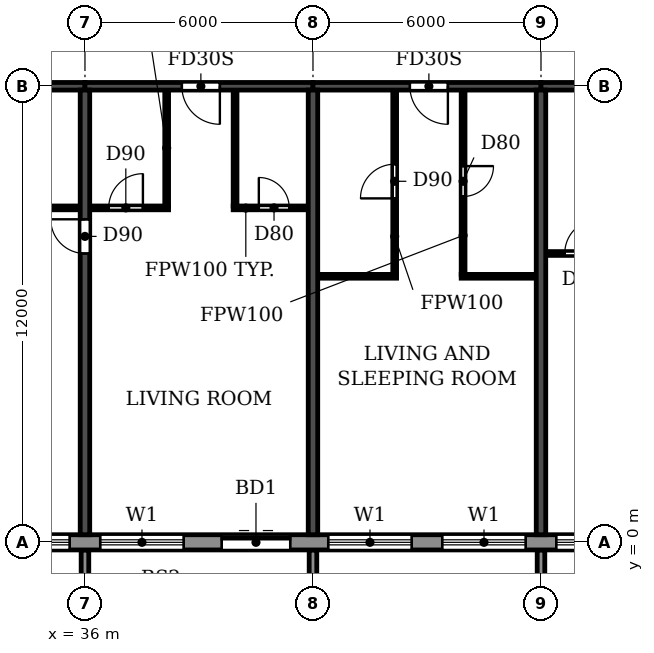
"""IFC4 building model, lengths in metres.
Left out: names, types, materials, properties, quantities, classifications, styles, units other than length and angle.
Written with IfcOpenShell. Run it as: python <this file> out.ifc"""

import sys

from ifc_helpers import new_model, si_unit, direction, frame, frame_2d, origin, place, context, subcontext, project, spatial, polyline, rectangle, outline, extrude, source, transform, mapped, element, fill, save


model = new_model("IFC4")
c1 = context("Model", 3, precision=1e-05, world=origin(), true_north=direction((0.0, 1.0)))
c2 = subcontext(c1, "Body", "Model", "MODEL_VIEW")
j1 = project(units=[si_unit("LENGTHUNIT", "METRE"), si_unit("PLANEANGLEUNIT", "RADIAN")], contexts=[c1])
p1 = place(None, origin())
s1 = spatial("IfcSite", under=j1, at=p1, CompositionType="ELEMENT")
p2 = place(p1, origin())
s2 = spatial("IfcBuilding", under=s1, at=p2, CompositionType="ELEMENT")
p3 = place(p2, frame((0.0, 0.0, 257.7)))
s3 = spatial("IfcBuildingStorey", under=s2, at=p3, CompositionType="ELEMENT", Elevation=257.7)
p4 = place(p3, frame((36.0, 0.2, 0.0), z_axis=(0.0, 0.0, 1.0), x_axis=(0.0, 1.0, 0.0)))
e1 = element("IfcWall", 1, at=p4, inside=s3, PredefinedType="SHEAR", context=c2, shape_type="SweptSolid", body=[
    extrude(rectangle(XDim=11.7, YDim=0.25, at=frame_2d((5.85, 0.0))), origin(), (0.0, 0.0, 1.0), 3.0),
])
p5 = place(p4, frame((7.4, 0.0, 0.0)))
e2 = element("IfcOpeningElement", 2, at=p5, cuts=e1, PredefinedType="OPENING", context=c2, shape_type="SweptSolid", body=[
    extrude(rectangle(XDim=0.9, YDim=2.1, at=frame_2d((0.45, 1.05))), frame((0.0, 0.135, 0.0), z_axis=(0.0, -1.0, 0.0), x_axis=(1.0, 0.0, 0.0)), (0.0, 0.0, 1.0), 0.27),
])
for number, where, z_axis, x_axis in (
    (3, (42.0, 0.2, 0.0), (0.0, 0.0, 1.0), (0.0, 1.0, 0.0)),
    (4, (48.0, 0.2, 0.0), (0.0, 0.0, 1.0), (0.0, 1.0, 0.0)),
):
    element("IfcWall", number, at=place(p3, frame(where, z_axis=z_axis, x_axis=x_axis)), inside=s3, PredefinedType="SHEAR", context=c2, shape_type="SweptSolid", body=[
        extrude(rectangle(XDim=11.7, YDim=0.25, at=frame_2d((5.85, 0.0))), origin(), (0.0, 0.0, 1.0), 3.0),
    ])
p6 = place(p3, frame((30.0, 12.0, 0.0), z_axis=(0.0, 0.0, 1.0), x_axis=(1.0, 0.0, 0.0)))
e5 = element("IfcWall", 5, at=p6, inside=s3, PredefinedType="SHEAR", context=c2, shape_type="SweptSolid", body=[
    extrude(rectangle(XDim=6.0, YDim=0.2, at=frame_2d((3.0, 0.0))), origin(), (0.0, 0.0, 1.0), 2.4),
])
p7 = place(p3, frame((36.0, 12.0, 0.0), z_axis=(0.0, 0.0, 1.0), x_axis=(1.0, 0.0, 0.0)))
e6 = element("IfcWall", 6, at=p7, inside=s3, PredefinedType="SHEAR", context=c2, shape_type="SweptSolid", body=[
    extrude(rectangle(XDim=6.0, YDim=0.2, at=frame_2d((3.0, 0.0))), origin(), (0.0, 0.0, 1.0), 2.4),
])
p8 = place(p7, frame((2.55, 0.0, 0.0)))
e7 = element("IfcOpeningElement", 7, at=p8, cuts=e6, PredefinedType="OPENING", context=c2, shape_type="SweptSolid", body=[
    extrude(rectangle(XDim=1.0, YDim=2.1, at=frame_2d((0.5, 1.05))), frame((0.0, 0.11, 0.0), z_axis=(0.0, -1.0, 0.0), x_axis=(1.0, 0.0, 0.0)), (0.0, 0.0, 1.0), 0.22),
])
p9 = place(p3, frame((42.0, 12.0, 0.0), z_axis=(0.0, 0.0, 1.0), x_axis=(1.0, 0.0, 0.0)))
e8 = element("IfcWall", 8, at=p9, inside=s3, PredefinedType="SHEAR", context=c2, shape_type="SweptSolid", body=[
    extrude(rectangle(XDim=6.0, YDim=0.2, at=frame_2d((3.0, 0.0))), origin(), (0.0, 0.0, 1.0), 2.4),
])
p10 = place(p9, frame((2.55, 0.0, 0.0)))
e9 = element("IfcOpeningElement", 9, at=p10, cuts=e8, PredefinedType="OPENING", context=c2, shape_type="SweptSolid", body=[
    extrude(rectangle(XDim=1.0, YDim=2.1, at=frame_2d((0.5, 1.05))), frame((0.0, 0.11, 0.0), z_axis=(0.0, -1.0, 0.0), x_axis=(1.0, 0.0, 0.0)), (0.0, 0.0, 1.0), 0.22),
])
p11 = place(p3, frame((48.0, 12.0, 0.0), z_axis=(0.0, 0.0, 1.0), x_axis=(1.0, 0.0, 0.0)))
e10 = element("IfcWall", 10, at=p11, inside=s3, PredefinedType="SHEAR", context=c2, shape_type="SweptSolid", body=[
    extrude(rectangle(XDim=6.0, YDim=0.2, at=frame_2d((3.0, 0.0))), origin(), (0.0, 0.0, 1.0), 2.4),
])
p12 = place(p11, frame((2.55, 0.0, 0.0)))
e11 = element("IfcOpeningElement", 11, at=p12, cuts=e10, PredefinedType="OPENING", context=c2, shape_type="SweptSolid", body=[
    extrude(rectangle(XDim=1.0, YDim=2.1, at=frame_2d((0.5, 1.05))), frame((0.0, 0.11, 0.0), z_axis=(0.0, -1.0, 0.0), x_axis=(1.0, 0.0, 0.0)), (0.0, 0.0, 1.0), 0.22),
])
p13 = place(p3, frame((22.683, 0.0, 0.0), z_axis=(0.0, 0.0, 1.0), x_axis=(1.0, 0.0, 0.0)))
e12 = element("IfcWall", 12, at=p13, inside=s3, PredefinedType="STANDARD", context=c2, shape_type="SweptSolid", body=[
    extrude(rectangle(XDim=56.634, YDim=0.4, at=frame_2d((28.317, 0.0))), origin(), (0.0, 0.0, 1.0), 3.0),
])
p14 = place(p13, frame((1.717, 0.0, 0.9)))
e13 = element("IfcOpeningElement", 13, at=p14, cuts=e12, PredefinedType="OPENING", context=c2, shape_type="SweptSolid", body=[
    extrude(rectangle(XDim=2.2, YDim=1.5, at=frame_2d((1.1, 0.75))), frame((0.0, 0.21, 0.0), z_axis=(0.0, -1.0, 0.0), x_axis=(1.0, 0.0, 0.0)), (0.0, 0.0, 1.0), 0.42),
])
p15 = place(p13, frame((4.917, 0.0, 0.0)))
e14 = element("IfcOpeningElement", 14, at=p15, cuts=e12, PredefinedType="OPENING", context=c2, shape_type="SweptSolid", body=[
    extrude(rectangle(XDim=1.8, YDim=2.4, at=frame_2d((0.9, 1.2))), frame((0.0, 0.21, 0.0), z_axis=(0.0, -1.0, 0.0), x_axis=(1.0, 0.0, 0.0)), (0.0, 0.0, 1.0), 0.42),
])
p16 = place(p13, frame((7.717, 0.0, 0.9)))
e15 = element("IfcOpeningElement", 15, at=p16, cuts=e12, PredefinedType="OPENING", context=c2, shape_type="SweptSolid", body=[
    extrude(rectangle(XDim=2.2, YDim=1.5, at=frame_2d((1.1, 0.75))), frame((0.0, 0.21, 0.0), z_axis=(0.0, -1.0, 0.0), x_axis=(1.0, 0.0, 0.0)), (0.0, 0.0, 1.0), 0.42),
])
p17 = place(p13, frame((10.717, 0.0, 0.9)))
e16 = element("IfcOpeningElement", 16, at=p17, cuts=e12, PredefinedType="OPENING", context=c2, shape_type="SweptSolid", body=[
    extrude(rectangle(XDim=2.2, YDim=1.5, at=frame_2d((1.1, 0.75))), frame((0.0, 0.21, 0.0), z_axis=(0.0, -1.0, 0.0), x_axis=(1.0, 0.0, 0.0)), (0.0, 0.0, 1.0), 0.42),
])
p18 = place(p13, frame((13.717, 0.0, 0.9)))
e17 = element("IfcOpeningElement", 17, at=p18, cuts=e12, PredefinedType="OPENING", context=c2, shape_type="SweptSolid", body=[
    extrude(rectangle(XDim=2.2, YDim=1.5, at=frame_2d((1.1, 0.75))), frame((0.0, 0.21, 0.0), z_axis=(0.0, -1.0, 0.0), x_axis=(1.0, 0.0, 0.0)), (0.0, 0.0, 1.0), 0.42),
])
p19 = place(p13, frame((16.917, 0.0, 0.0)))
e18 = element("IfcOpeningElement", 18, at=p19, cuts=e12, PredefinedType="OPENING", context=c2, shape_type="SweptSolid", body=[
    extrude(rectangle(XDim=1.8, YDim=2.4, at=frame_2d((0.9, 1.2))), frame((0.0, 0.21, 0.0), z_axis=(0.0, -1.0, 0.0), x_axis=(1.0, 0.0, 0.0)), (0.0, 0.0, 1.0), 0.42),
])
p20 = place(p13, frame((19.717, 0.0, 0.9)))
e19 = element("IfcOpeningElement", 19, at=p20, cuts=e12, PredefinedType="OPENING", context=c2, shape_type="SweptSolid", body=[
    extrude(rectangle(XDim=2.2, YDim=1.5, at=frame_2d((1.1, 0.75))), frame((0.0, 0.21, 0.0), z_axis=(0.0, -1.0, 0.0), x_axis=(1.0, 0.0, 0.0)), (0.0, 0.0, 1.0), 0.42),
])
p21 = place(p13, frame((22.717, 0.0, 0.9)))
e20 = element("IfcOpeningElement", 20, at=p21, cuts=e12, PredefinedType="OPENING", context=c2, shape_type="SweptSolid", body=[
    extrude(rectangle(XDim=2.2, YDim=1.5, at=frame_2d((1.1, 0.75))), frame((0.0, 0.21, 0.0), z_axis=(0.0, -1.0, 0.0), x_axis=(1.0, 0.0, 0.0)), (0.0, 0.0, 1.0), 0.42),
])
p22 = place(p13, frame((25.717, 0.0, 0.9)))
e21 = element("IfcOpeningElement", 21, at=p22, cuts=e12, PredefinedType="OPENING", context=c2, shape_type="SweptSolid", body=[
    extrude(rectangle(XDim=2.2, YDim=1.5, at=frame_2d((1.1, 0.75))), frame((0.0, 0.21, 0.0), z_axis=(0.0, -1.0, 0.0), x_axis=(1.0, 0.0, 0.0)), (0.0, 0.0, 1.0), 0.42),
])
p23 = place(p13, frame((28.917, 0.0, 0.0)))
e22 = element("IfcOpeningElement", 22, at=p23, cuts=e12, PredefinedType="OPENING", context=c2, shape_type="SweptSolid", body=[
    extrude(rectangle(XDim=1.8, YDim=2.4, at=frame_2d((0.9, 1.2))), frame((0.0, 0.21, 0.0), z_axis=(0.0, -1.0, 0.0), x_axis=(1.0, 0.0, 0.0)), (0.0, 0.0, 1.0), 0.42),
])
p24 = place(p13, frame((31.717, 0.0, 0.9)))
e23 = element("IfcOpeningElement", 23, at=p24, cuts=e12, PredefinedType="OPENING", context=c2, shape_type="SweptSolid", body=[
    extrude(rectangle(XDim=2.2, YDim=1.5, at=frame_2d((1.1, 0.75))), frame((0.0, 0.21, 0.0), z_axis=(0.0, -1.0, 0.0), x_axis=(1.0, 0.0, 0.0)), (0.0, 0.0, 1.0), 0.42),
])
p25 = place(p13, frame((34.717, 0.0, 0.9)))
e24 = element("IfcOpeningElement", 24, at=p25, cuts=e12, PredefinedType="OPENING", context=c2, shape_type="SweptSolid", body=[
    extrude(rectangle(XDim=2.2, YDim=1.5, at=frame_2d((1.1, 0.75))), frame((0.0, 0.21, 0.0), z_axis=(0.0, -1.0, 0.0), x_axis=(1.0, 0.0, 0.0)), (0.0, 0.0, 1.0), 0.42),
])
p26 = place(p13, frame((37.717, 0.0, 0.9)))
e25 = element("IfcOpeningElement", 25, at=p26, cuts=e12, PredefinedType="OPENING", context=c2, shape_type="SweptSolid", body=[
    extrude(rectangle(XDim=2.2, YDim=1.5, at=frame_2d((1.1, 0.75))), frame((0.0, 0.21, 0.0), z_axis=(0.0, -1.0, 0.0), x_axis=(1.0, 0.0, 0.0)), (0.0, 0.0, 1.0), 0.42),
])
p27 = place(p13, frame((40.917, 0.0, 0.0)))
e26 = element("IfcOpeningElement", 26, at=p27, cuts=e12, PredefinedType="OPENING", context=c2, shape_type="SweptSolid", body=[
    extrude(rectangle(XDim=1.8, YDim=2.4, at=frame_2d((0.9, 1.2))), frame((0.0, 0.21, 0.0), z_axis=(0.0, -1.0, 0.0), x_axis=(1.0, 0.0, 0.0)), (0.0, 0.0, 1.0), 0.42),
])
p28 = place(p13, frame((43.717, 0.0, 0.9)))
e27 = element("IfcOpeningElement", 27, at=p28, cuts=e12, PredefinedType="OPENING", context=c2, shape_type="SweptSolid", body=[
    extrude(rectangle(XDim=2.2, YDim=1.5, at=frame_2d((1.1, 0.75))), frame((0.0, 0.21, 0.0), z_axis=(0.0, -1.0, 0.0), x_axis=(1.0, 0.0, 0.0)), (0.0, 0.0, 1.0), 0.42),
])
p29 = place(p13, frame((46.717, 0.0, 0.9)))
e28 = element("IfcOpeningElement", 28, at=p29, cuts=e12, PredefinedType="OPENING", context=c2, shape_type="SweptSolid", body=[
    extrude(rectangle(XDim=2.2, YDim=1.5, at=frame_2d((1.1, 0.75))), frame((0.0, 0.21, 0.0), z_axis=(0.0, -1.0, 0.0), x_axis=(1.0, 0.0, 0.0)), (0.0, 0.0, 1.0), 0.42),
])
p30 = place(p13, frame((49.717, 0.0, 0.9)))
e29 = element("IfcOpeningElement", 29, at=p30, cuts=e12, PredefinedType="OPENING", context=c2, shape_type="SweptSolid", body=[
    extrude(rectangle(XDim=2.2, YDim=1.5, at=frame_2d((1.1, 0.75))), frame((0.0, 0.21, 0.0), z_axis=(0.0, -1.0, 0.0), x_axis=(1.0, 0.0, 0.0)), (0.0, 0.0, 1.0), 0.42),
])
p31 = place(p13, frame((52.917, 0.0, 0.0)))
e30 = element("IfcOpeningElement", 30, at=p31, cuts=e12, PredefinedType="OPENING", context=c2, shape_type="SweptSolid", body=[
    extrude(rectangle(XDim=1.8, YDim=2.4, at=frame_2d((0.9, 1.2))), frame((0.0, 0.21, 0.0), z_axis=(0.0, -1.0, 0.0), x_axis=(1.0, 0.0, 0.0)), (0.0, 0.0, 1.0), 0.42),
])
m1 = source(origin(), c2, "Body", "SweptSolid", [
    extrude(outline(polyline([(0.0, 0.0), (0.2, 0.0), (0.2, 1.65), (0.0, 1.65), (0.0, 0.0)])), origin(), (0.0, 0.0, 1.0), 3.1),
])
for number, where in (
    (31, (35.9, -1.85, 0.0)),
    (32, (41.9, -1.85, 0.0)),
    (33, (47.9, -1.85, 0.0)),
):
    element("IfcWall", number, at=place(p3, frame(where)), inside=s3, PredefinedType="STANDARD", context=c2, shape_type="MappedRepresentation", body=[
        mapped(m1, transform((0.0, 0.0, 0.0))),
    ])
p32 = place(p3, frame((42.135, 7.0, 0.0), z_axis=(0.0, 0.0, 1.0), x_axis=(1.0, 0.0, 0.0)))
e34 = element("IfcWall", 34, at=p32, inside=s3, PredefinedType="PARTITIONING", context=c2, shape_type="SweptSolid", body=[
    extrude(rectangle(XDim=2.065, YDim=0.1, at=frame_2d((1.032, 0.0))), origin(), (0.0, 0.0, 1.0), 3.0),
])
p33 = place(p3, frame((45.9, 7.0, 0.0), z_axis=(0.0, 0.0, 1.0), x_axis=(1.0, 0.0, 0.0)))
e35 = element("IfcWall", 35, at=p33, inside=s3, PredefinedType="PARTITIONING", context=c2, shape_type="SweptSolid", body=[
    extrude(rectangle(XDim=1.965, YDim=0.1, at=frame_2d((0.982, 0.0))), origin(), (0.0, 0.0, 1.0), 3.0),
])
p34 = place(p3, frame((48.135, 7.6, 0.0), z_axis=(0.0, 0.0, 1.0), x_axis=(1.0, 0.0, 0.0)))
e36 = element("IfcWall", 36, at=p34, inside=s3, PredefinedType="PARTITIONING", context=c2, shape_type="SweptSolid", body=[
    extrude(rectangle(XDim=2.065, YDim=0.1, at=frame_2d((1.032, 0.0))), origin(), (0.0, 0.0, 1.0), 3.0),
])
p35 = place(p34, frame((0.49, 0.0, 0.0)))
e37 = element("IfcOpeningElement", 37, at=p35, cuts=e36, PredefinedType="OPENING", context=c2, shape_type="SweptSolid", body=[
    extrude(rectangle(XDim=0.9, YDim=2.1, at=frame_2d((0.45, 1.05))), frame((0.0, 0.06, 0.0), z_axis=(0.0, -1.0, 0.0), x_axis=(1.0, 0.0, 0.0)), (0.0, 0.0, 1.0), 0.12),
])
p36 = place(p3, frame((33.1, 8.8, 0.0), z_axis=(0.0, 0.0, 1.0), x_axis=(1.0, 0.0, 0.0)))
e38 = element("IfcWall", 38, at=p36, inside=s3, PredefinedType="PARTITIONING", context=c2, shape_type="SweptSolid", body=[
    extrude(rectangle(XDim=2.765, YDim=0.1, at=frame_2d((1.382, 0.0))), origin(), (0.0, 0.0, 1.0), 3.0),
])
p37 = place(p36, frame((1.0, 0.0, 0.0)))
e39 = element("IfcOpeningElement", 39, at=p37, cuts=e38, PredefinedType="OPENING", context=c2, shape_type="SweptSolid", body=[
    extrude(rectangle(XDim=0.8, YDim=2.1, at=frame_2d((0.4, 1.05))), frame((0.0, 0.06, 0.0), z_axis=(0.0, -1.0, 0.0), x_axis=(1.0, 0.0, 0.0)), (0.0, 0.0, 1.0), 0.12),
])
p38 = place(p3, frame((36.135, 8.8, 0.0), z_axis=(0.0, 0.0, 1.0), x_axis=(1.0, 0.0, 0.0)))
e40 = element("IfcWall", 40, at=p38, inside=s3, PredefinedType="PARTITIONING", context=c2, shape_type="SweptSolid", body=[
    extrude(rectangle(XDim=2.065, YDim=0.1, at=frame_2d((1.032, 0.0))), origin(), (0.0, 0.0, 1.0), 3.0),
])
p39 = place(p38, frame((0.49, 0.0, 0.0)))
e41 = element("IfcOpeningElement", 41, at=p39, cuts=e40, PredefinedType="OPENING", context=c2, shape_type="SweptSolid", body=[
    extrude(rectangle(XDim=0.9, YDim=2.1, at=frame_2d((0.45, 1.05))), frame((0.0, 0.06, 0.0), z_axis=(0.0, -1.0, 0.0), x_axis=(1.0, 0.0, 0.0)), (0.0, 0.0, 1.0), 0.12),
])
p40 = place(p3, frame((39.9, 8.8, 0.0), z_axis=(0.0, 0.0, 1.0), x_axis=(1.0, 0.0, 0.0)))
e42 = element("IfcWall", 42, at=p40, inside=s3, PredefinedType="PARTITIONING", context=c2, shape_type="SweptSolid", body=[
    extrude(rectangle(XDim=1.965, YDim=0.1, at=frame_2d((0.982, 0.0))), origin(), (0.0, 0.0, 1.0), 3.0),
])
p41 = place(p40, frame((0.675, 0.0, 0.0)))
e43 = element("IfcOpeningElement", 43, at=p41, cuts=e42, PredefinedType="OPENING", context=c2, shape_type="SweptSolid", body=[
    extrude(rectangle(XDim=0.8, YDim=2.1, at=frame_2d((0.4, 1.05))), frame((0.0, 0.06, 0.0), z_axis=(0.0, -1.0, 0.0), x_axis=(1.0, 0.0, 0.0)), (0.0, 0.0, 1.0), 0.12),
])
for number, where, z_axis, x_axis in (
    (44, (38.15, 8.85, 0.0), (0.0, 0.0, 1.0), (0.0, 1.0, 0.0)),
    (45, (39.95, 8.85, 0.0), (0.0, 0.0, 1.0), (0.0, 1.0, 0.0)),
):
    element("IfcWall", number, at=place(p3, frame(where, z_axis=z_axis, x_axis=x_axis)), inside=s3, PredefinedType="PARTITIONING", context=c2, shape_type="SweptSolid", body=[
        extrude(rectangle(XDim=3.04, YDim=0.1, at=frame_2d((1.52, 0.0))), origin(), (0.0, 0.0, 1.0), 3.0),
    ])
p42 = place(p3, frame((44.15, 7.05, 0.0), z_axis=(0.0, 0.0, 1.0), x_axis=(0.0, 1.0, 0.0)))
e46 = element("IfcWall", 46, at=p42, inside=s3, PredefinedType="PARTITIONING", context=c2, shape_type="SweptSolid", body=[
    extrude(rectangle(XDim=4.84, YDim=0.1, at=frame_2d((2.42, 0.0))), origin(), (0.0, 0.0, 1.0), 3.0),
])
p43 = place(p42, frame((2.0, 0.0, 0.0)))
e47 = element("IfcOpeningElement", 47, at=p43, cuts=e46, PredefinedType="OPENING", context=c2, shape_type="SweptSolid", body=[
    extrude(rectangle(XDim=0.9, YDim=2.1, at=frame_2d((0.45, 1.05))), frame((0.0, 0.06, 0.0), z_axis=(0.0, -1.0, 0.0), x_axis=(1.0, 0.0, 0.0)), (0.0, 0.0, 1.0), 0.12),
])
p44 = place(p3, frame((45.95, 7.05, 0.0), z_axis=(0.0, 0.0, 1.0), x_axis=(0.0, 1.0, 0.0)))
e48 = element("IfcWall", 48, at=p44, inside=s3, PredefinedType="PARTITIONING", context=c2, shape_type="SweptSolid", body=[
    extrude(rectangle(XDim=4.84, YDim=0.1, at=frame_2d((2.42, 0.0))), origin(), (0.0, 0.0, 1.0), 3.0),
])
p45 = place(p44, frame((2.05, 0.0, 0.0)))
e49 = element("IfcOpeningElement", 49, at=p45, cuts=e48, PredefinedType="OPENING", context=c2, shape_type="SweptSolid", body=[
    extrude(rectangle(XDim=0.8, YDim=2.1, at=frame_2d((0.4, 1.05))), frame((0.0, 0.06, 0.0), z_axis=(0.0, -1.0, 0.0), x_axis=(1.0, 0.0, 0.0)), (0.0, 0.0, 1.0), 0.12),
])
p46 = place(p17, origin())
e50 = element("IfcWindow", 50, at=p46, inside=s3, PartitioningType="DOUBLE_PANEL_HORIZONTAL", PredefinedType="WINDOW", context=c2, shape_type="SweptSolid", body=[
    extrude(rectangle(XDim=2.2, YDim=1.5, at=frame_2d((1.1, 0.75))), frame((0.0, 0.03, 0.0), z_axis=(0.0, -1.0, 0.0), x_axis=(1.0, 0.0, 0.0)), (0.0, 0.0, 1.0), 0.06),
])
fill(e16, e50)
p47 = place(p18, origin())
e51 = element("IfcWindow", 51, at=p47, inside=s3, PartitioningType="DOUBLE_PANEL_HORIZONTAL", PredefinedType="WINDOW", context=c2, shape_type="SweptSolid", body=[
    extrude(rectangle(XDim=2.2, YDim=1.5, at=frame_2d((1.1, 0.75))), frame((0.0, 0.03, 0.0), z_axis=(0.0, -1.0, 0.0), x_axis=(1.0, 0.0, 0.0)), (0.0, 0.0, 1.0), 0.06),
])
fill(e17, e51)
p48 = place(p19, origin())
e52 = element("IfcDoor", 52, at=p48, inside=s3, OperationType="DOUBLE_DOOR_SLIDING", PredefinedType="DOOR", context=c2, shape_type="SweptSolid", body=[
    extrude(rectangle(XDim=1.8, YDim=2.4, at=frame_2d((0.9, 1.2))), frame((0.0, 0.025, 0.0), z_axis=(0.0, -1.0, 0.0), x_axis=(1.0, 0.0, 0.0)), (0.0, 0.0, 1.0), 0.05),
])
fill(e18, e52)
p49 = place(p20, origin())
e53 = element("IfcWindow", 53, at=p49, inside=s3, PartitioningType="DOUBLE_PANEL_HORIZONTAL", PredefinedType="WINDOW", context=c2, shape_type="SweptSolid", body=[
    extrude(rectangle(XDim=2.2, YDim=1.5, at=frame_2d((1.1, 0.75))), frame((0.0, 0.03, 0.0), z_axis=(0.0, -1.0, 0.0), x_axis=(1.0, 0.0, 0.0)), (0.0, 0.0, 1.0), 0.06),
])
fill(e19, e53)
p50 = place(p21, origin())
e54 = element("IfcWindow", 54, at=p50, inside=s3, PartitioningType="DOUBLE_PANEL_HORIZONTAL", PredefinedType="WINDOW", context=c2, shape_type="SweptSolid", body=[
    extrude(rectangle(XDim=2.2, YDim=1.5, at=frame_2d((1.1, 0.75))), frame((0.0, 0.03, 0.0), z_axis=(0.0, -1.0, 0.0), x_axis=(1.0, 0.0, 0.0)), (0.0, 0.0, 1.0), 0.06),
])
fill(e20, e54)
p51 = place(p22, origin())
e55 = element("IfcWindow", 55, at=p51, inside=s3, PartitioningType="DOUBLE_PANEL_HORIZONTAL", PredefinedType="WINDOW", context=c2, shape_type="SweptSolid", body=[
    extrude(rectangle(XDim=2.2, YDim=1.5, at=frame_2d((1.1, 0.75))), frame((0.0, 0.03, 0.0), z_axis=(0.0, -1.0, 0.0), x_axis=(1.0, 0.0, 0.0)), (0.0, 0.0, 1.0), 0.06),
])
fill(e21, e55)
p52 = place(p5, origin())
e56 = element("IfcDoor", 56, at=p52, inside=s3, OperationType="SINGLE_SWING_RIGHT", PredefinedType="DOOR", context=c2, shape_type="SweptSolid", body=[
    extrude(rectangle(XDim=0.9, YDim=2.1, at=frame_2d((0.45, 1.05))), frame((0.0, 0.025, 0.0), z_axis=(0.0, -1.0, 0.0), x_axis=(1.0, 0.0, 0.0)), (0.0, 0.0, 1.0), 0.05),
])
fill(e2, e56)
p53 = place(p39, origin())
e57 = element("IfcDoor", 57, at=p53, inside=s3, OperationType="SINGLE_SWING_RIGHT", PredefinedType="DOOR", context=c2, shape_type="SweptSolid", body=[
    extrude(rectangle(XDim=0.9, YDim=2.1, at=frame_2d((0.45, 1.05))), frame((0.0, 0.025, 0.0), z_axis=(0.0, -1.0, 0.0), x_axis=(1.0, 0.0, 0.0)), (0.0, 0.0, 1.0), 0.05),
])
fill(e41, e57)
p54 = place(p8, frame((1.0, 0.0, 0.0), z_axis=(0.0, 0.0, 1.0), x_axis=(-1.0, 0.0, 0.0)))
e58 = element("IfcDoor", 58, at=p54, inside=s3, OperationType="SINGLE_SWING_LEFT", PredefinedType="DOOR", context=c2, shape_type="SweptSolid", body=[
    extrude(rectangle(XDim=1.0, YDim=2.1, at=frame_2d((0.5, 1.05))), frame((0.0, 0.025, 0.0), z_axis=(0.0, -1.0, 0.0), x_axis=(1.0, 0.0, 0.0)), (0.0, 0.0, 1.0), 0.05),
])
fill(e7, e58)
p55 = place(p41, origin())
e59 = element("IfcDoor", 59, at=p55, inside=s3, OperationType="SINGLE_SWING_LEFT", PredefinedType="DOOR", context=c2, shape_type="SweptSolid", body=[
    extrude(rectangle(XDim=0.8, YDim=2.1, at=frame_2d((0.4, 1.05))), frame((0.0, 0.025, 0.0), z_axis=(0.0, -1.0, 0.0), x_axis=(1.0, 0.0, 0.0)), (0.0, 0.0, 1.0), 0.05),
])
fill(e43, e59)
p56 = place(p43, origin())
e60 = element("IfcDoor", 60, at=p56, inside=s3, OperationType="SINGLE_SWING_LEFT", PredefinedType="DOOR", context=c2, shape_type="SweptSolid", body=[
    extrude(rectangle(XDim=0.9, YDim=2.1, at=frame_2d((0.45, 1.05))), frame((0.0, 0.025, 0.0), z_axis=(0.0, -1.0, 0.0), x_axis=(1.0, 0.0, 0.0)), (0.0, 0.0, 1.0), 0.05),
])
fill(e47, e60)
p57 = place(p10, frame((1.0, 0.0, 0.0), z_axis=(0.0, 0.0, 1.0), x_axis=(-1.0, 0.0, 0.0)))
e61 = element("IfcDoor", 61, at=p57, inside=s3, OperationType="SINGLE_SWING_LEFT", PredefinedType="DOOR", context=c2, shape_type="SweptSolid", body=[
    extrude(rectangle(XDim=1.0, YDim=2.1, at=frame_2d((0.5, 1.05))), frame((0.0, 0.025, 0.0), z_axis=(0.0, -1.0, 0.0), x_axis=(1.0, 0.0, 0.0)), (0.0, 0.0, 1.0), 0.05),
])
fill(e9, e61)
p58 = place(p45, frame((0.8, 0.0, 0.0), z_axis=(0.0, 0.0, 1.0), x_axis=(-1.0, 0.0, 0.0)))
e62 = element("IfcDoor", 62, at=p58, inside=s3, OperationType="SINGLE_SWING_LEFT", PredefinedType="DOOR", context=c2, shape_type="SweptSolid", body=[
    extrude(rectangle(XDim=0.8, YDim=2.1, at=frame_2d((0.4, 1.05))), frame((0.0, 0.025, 0.0), z_axis=(0.0, -1.0, 0.0), x_axis=(1.0, 0.0, 0.0)), (0.0, 0.0, 1.0), 0.05),
])
fill(e49, e62)
p59 = place(p35, origin())
e63 = element("IfcDoor", 63, at=p59, inside=s3, OperationType="SINGLE_SWING_RIGHT", PredefinedType="DOOR", context=c2, shape_type="SweptSolid", body=[
    extrude(rectangle(XDim=0.9, YDim=2.1, at=frame_2d((0.45, 1.05))), frame((0.0, 0.025, 0.0), z_axis=(0.0, -1.0, 0.0), x_axis=(1.0, 0.0, 0.0)), (0.0, 0.0, 1.0), 0.05),
])
fill(e37, e63)
save(model, sys.argv[1])
